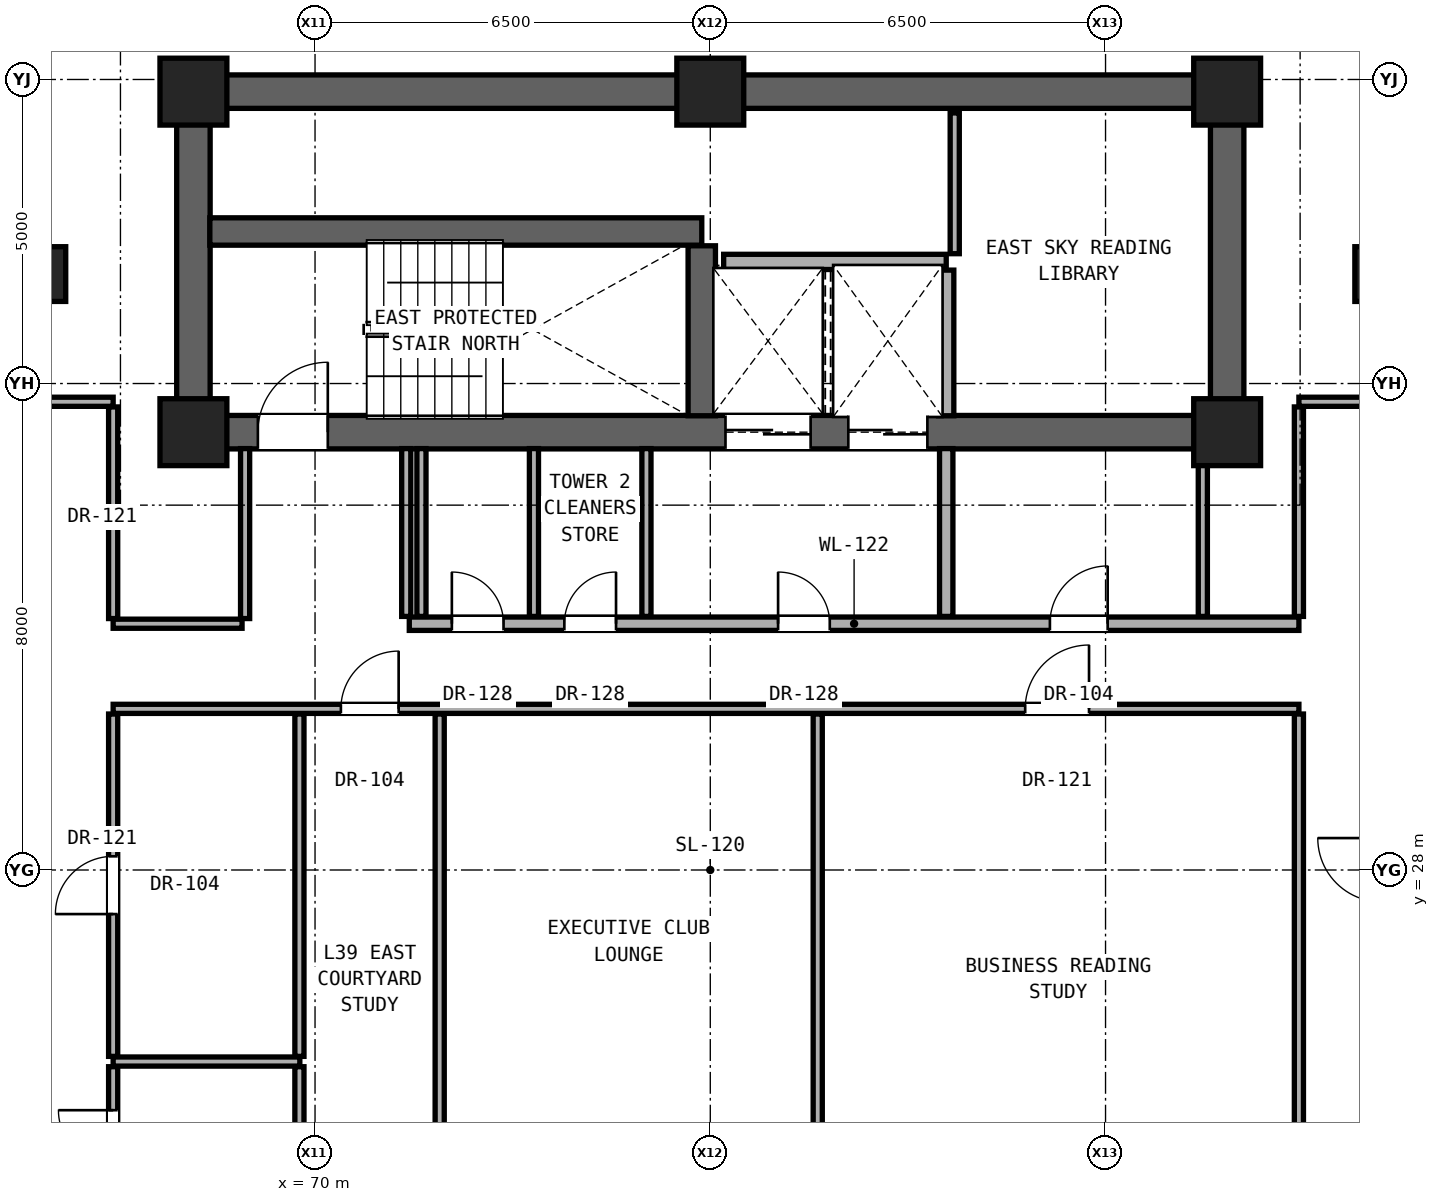
"""IFC4 building model, lengths in metres.
Left out: names, types, materials, properties, quantities, classifications, styles, units other than length and angle.
Written with IfcOpenShell. Run it as: python <this file> out.ifc"""

import sys

from ifc_helpers import new_model, si_unit, direction, frame, frame_2d, origin, origin_2d, place, context, subcontext, project, spatial, rectangle, extrude, element, fill, save


model = new_model("IFC4")
c1 = context("Model", 3, precision=1e-05, world=origin(), true_north=direction((0.0, 1.0)))
c2 = subcontext(c1, "Body", "Model", "MODEL_VIEW")
j1 = project(units=[si_unit("LENGTHUNIT", "METRE"), si_unit("PLANEANGLEUNIT", "RADIAN")], contexts=[c1])
p1 = place(None, origin())
s1 = spatial("IfcSite", under=j1, at=p1, CompositionType="ELEMENT")
p2 = place(p1, origin())
s2 = spatial("IfcBuilding", under=s1, at=p2, CompositionType="ELEMENT")
p3 = place(p2, frame((0.0, 0.0, 137.9)))
s3 = spatial("IfcBuildingStorey", under=s2, at=p3, CompositionType="ELEMENT", Elevation=137.9)
for number, where, z_axis, x_axis in (
    (1, (68.0, 35.2, 0.0), (0.0, 0.0, 1.0), (1.0, 0.0, 0.0)),
    (2, (85.0, 35.2, 0.0), (0.0, 0.0, 1.0), (1.0, 0.0, 0.0)),
    (3, (68.0, 40.8, 0.0), (0.0, 0.0, 1.0), (1.0, 0.0, 0.0)),
    (4, (76.5, 40.8, 0.0), (0.0, 0.0, 1.0), (1.0, 0.0, 0.0)),
    (5, (85.0, 40.8, 0.0), (0.0, 0.0, 1.0), (1.0, 0.0, 0.0)),
):
    element("IfcColumn", number, at=place(p3, frame(where, z_axis=z_axis, x_axis=x_axis)), inside=s3, PredefinedType="COLUMN", context=c2, shape_type="SweptSolid", body=[
        extrude(rectangle(XDim=1.1, YDim=1.1, at=origin_2d()), origin(), (0.0, 0.0, 1.0), 3.3),
    ])
for number, where, z_axis, x_axis in (
    (6, (65.6, 37.8, 0.0), (0.0, 0.0, 1.0), (1.0, 0.0, 0.0)),
    (7, (87.4, 37.8, 0.0), (0.0, 0.0, 1.0), (1.0, 0.0, 0.0)),
):
    element("IfcColumn", number, at=place(p3, frame(where, z_axis=z_axis, x_axis=x_axis)), inside=s3, PredefinedType="PILASTER", context=c2, shape_type="SweptSolid", body=[
        extrude(rectangle(XDim=0.6, YDim=0.9, at=origin_2d()), origin(), (0.0, 0.0, 1.0), 3.3),
    ])
p4 = place(p3, frame((68.0, 40.8, 0.0), z_axis=(0.0, 0.0, 1.0), x_axis=(1.0, 0.0, 0.0)))
e8 = element("IfcWall", 8, at=p4, inside=s3, PredefinedType="SHEAR", context=c2, shape_type="SweptSolid", body=[
    extrude(rectangle(XDim=17.0, YDim=0.55, at=frame_2d((8.5, 0.0))), origin(), (0.0, 0.0, 1.0), 3.08),
])
for number, where, z_axis, x_axis in (
    (9, (68.0, 35.2, 0.0), (0.0, 0.0, 1.0), (0.0, 1.0, 0.0)),
    (10, (85.0, 35.2, 0.0), (0.0, 0.0, 1.0), (0.0, 1.0, 0.0)),
):
    element("IfcWall", number, at=place(p3, frame(where, z_axis=z_axis, x_axis=x_axis)), inside=s3, PredefinedType="SHEAR", context=c2, shape_type="SweptSolid", body=[
        extrude(rectangle(XDim=5.6, YDim=0.55, at=frame_2d((2.8, 0.0))), origin(), (0.0, 0.0, 1.0), 3.08),
    ])
p5 = place(p3, frame((68.0, 35.2, 0.0), z_axis=(0.0, 0.0, 1.0), x_axis=(1.0, 0.0, 0.0)))
e11 = element("IfcWall", 11, at=p5, inside=s3, PredefinedType="SHEAR", context=c2, shape_type="SweptSolid", body=[
    extrude(rectangle(XDim=17.0, YDim=0.55, at=frame_2d((8.5, 0.0))), origin(), (0.0, 0.0, 1.0), 3.08),
])
p6 = place(p5, frame((1.06, 0.0, 0.0)))
e12 = element("IfcOpeningElement", 12, at=p6, cuts=e11, PredefinedType="OPENING", context=c2, shape_type="SweptSolid", body=[
    extrude(rectangle(XDim=1.15, YDim=2.2, at=frame_2d((0.575, 1.1))), frame((0.0, 0.285, 0.0), z_axis=(0.0, -1.0, 0.0), x_axis=(1.0, 0.0, 0.0)), (0.0, 0.0, 1.0), 0.57),
])
p7 = place(p5, frame((8.75, 0.0, 0.0)))
e13 = element("IfcOpeningElement", 13, at=p7, cuts=e11, PredefinedType="OPENING", context=c2, shape_type="SweptSolid", body=[
    extrude(rectangle(XDim=1.4, YDim=2.35, at=frame_2d((0.7, 1.175))), frame((0.0, 0.285, 0.0), z_axis=(0.0, -1.0, 0.0), x_axis=(1.0, 0.0, 0.0)), (0.0, 0.0, 1.0), 0.57),
])
p8 = place(p5, frame((10.77, 0.0, 0.0)))
e14 = element("IfcOpeningElement", 14, at=p8, cuts=e11, PredefinedType="OPENING", context=c2, shape_type="SweptSolid", body=[
    extrude(rectangle(XDim=1.3, YDim=2.3, at=frame_2d((0.65, 1.15))), frame((0.0, 0.285, 0.0), z_axis=(0.0, -1.0, 0.0), x_axis=(1.0, 0.0, 0.0)), (0.0, 0.0, 1.0), 0.57),
])
p9 = place(p3, frame((66.68, 24.85, 0.0), z_axis=(0.0, 0.0, 1.0), x_axis=(1.0, 0.0, 0.0)))
e15 = element("IfcWall", 15, at=p9, inside=s3, PredefinedType="PARTITIONING", context=c2, shape_type="SweptSolid", body=[
    extrude(rectangle(XDim=3.07, YDim=0.15, at=frame_2d((1.535, 0.0))), origin(), (0.0, 0.0, 1.0), 2.216),
])
p10 = place(p3, frame((66.68, 30.65, 0.0), z_axis=(0.0, 0.0, 1.0), x_axis=(1.0, 0.0, 0.0)))
e16 = element("IfcWall", 16, at=p10, inside=s3, PredefinedType="PARTITIONING", context=c2, shape_type="SweptSolid", body=[
    extrude(rectangle(XDim=19.5, YDim=0.15, at=frame_2d((9.75, 0.0))), origin(), (0.0, 0.0, 1.0), 2.216),
])
p11 = place(p10, frame((3.745, 0.0, 0.0)))
e17 = element("IfcOpeningElement", 17, at=p11, cuts=e16, PredefinedType="OPENING", context=c2, shape_type="SweptSolid", body=[
    extrude(rectangle(XDim=0.95, YDim=2.15, at=frame_2d((0.475, 1.075))), frame((0.0, 0.085, 0.0), z_axis=(0.0, -1.0, 0.0), x_axis=(1.0, 0.0, 0.0)), (0.0, 0.0, 1.0), 0.17),
])
p12 = place(p10, frame((14.999, 0.0, 0.0)))
e18 = element("IfcOpeningElement", 18, at=p12, cuts=e16, PredefinedType="OPENING", context=c2, shape_type="SweptSolid", body=[
    extrude(rectangle(XDim=1.05, YDim=2.2, at=frame_2d((0.525, 1.1))), frame((0.0, 0.085, 0.0), z_axis=(0.0, -1.0, 0.0), x_axis=(1.0, 0.0, 0.0)), (0.0, 0.0, 1.0), 0.17),
])
p13 = place(p3, frame((66.68, 32.05, 0.0), z_axis=(0.0, 0.0, 1.0), x_axis=(1.0, 0.0, 0.0)))
e19 = element("IfcWall", 19, at=p13, inside=s3, PredefinedType="PARTITIONING", context=c2, shape_type="SweptSolid", body=[
    extrude(rectangle(XDim=2.12, YDim=0.15, at=frame_2d((1.06, 0.0))), origin(), (0.0, 0.0, 1.0), 2.216),
])
p14 = place(p3, frame((71.55, 32.05, 0.0), z_axis=(0.0, 0.0, 1.0), x_axis=(1.0, 0.0, 0.0)))
e20 = element("IfcWall", 20, at=p14, inside=s3, PredefinedType="SOLIDWALL", context=c2, shape_type="SweptSolid", body=[
    extrude(rectangle(XDim=14.63, YDim=0.22, at=frame_2d((7.315, 0.0))), origin(), (0.0, 0.0, 1.0), 2.216),
])
p15 = place(p14, frame((6.065, 0.0, 0.0)))
e21 = element("IfcOpeningElement", 21, at=p15, cuts=e20, PredefinedType="OPENING", context=c2, shape_type="SweptSolid", body=[
    extrude(rectangle(XDim=0.85, YDim=2.01, at=frame_2d((0.425, 1.005))), frame((0.0, 0.12, 0.0), z_axis=(0.0, -1.0, 0.0), x_axis=(1.0, 0.0, 0.0)), (0.0, 0.0, 1.0), 0.24),
])
p16 = place(p14, frame((10.535, 0.0, 0.0)))
e22 = element("IfcOpeningElement", 22, at=p16, cuts=e20, PredefinedType="OPENING", context=c2, shape_type="SweptSolid", body=[
    extrude(rectangle(XDim=0.95, YDim=2.15, at=frame_2d((0.475, 1.075))), frame((0.0, 0.12, 0.0), z_axis=(0.0, -1.0, 0.0), x_axis=(1.0, 0.0, 0.0)), (0.0, 0.0, 1.0), 0.24),
])
p17 = place(p14, frame((0.7, 0.0, 0.0)))
e23 = element("IfcOpeningElement", 23, at=p17, cuts=e20, PredefinedType="OPENING", context=c2, shape_type="SweptSolid", body=[
    extrude(rectangle(XDim=0.85, YDim=2.01, at=frame_2d((0.425, 1.005))), frame((0.0, 0.12, 0.0), z_axis=(0.0, -1.0, 0.0), x_axis=(1.0, 0.0, 0.0)), (0.0, 0.0, 1.0), 0.24),
])
p18 = place(p14, frame((2.55, 0.0, 0.0)))
e24 = element("IfcOpeningElement", 24, at=p18, cuts=e20, PredefinedType="OPENING", context=c2, shape_type="SweptSolid", body=[
    extrude(rectangle(XDim=0.85, YDim=2.01, at=frame_2d((0.425, 1.005))), frame((0.0, 0.12, 0.0), z_axis=(0.0, -1.0, 0.0), x_axis=(1.0, 0.0, 0.0)), (0.0, 0.0, 1.0), 0.24),
])
p19 = place(p3, frame((65.32, 35.7, 0.0), z_axis=(0.0, 0.0, 1.0), x_axis=(1.0, 0.0, 0.0)))
e25 = element("IfcWall", 25, at=p19, inside=s3, PredefinedType="PARTITIONING", context=c2, shape_type="SweptSolid", body=[
    extrude(rectangle(XDim=1.36, YDim=0.15, at=frame_2d((0.68, 0.0))), origin(), (0.0, 0.0, 1.0), 3.08),
])
p20 = place(p3, frame((86.18, 35.7, 0.0), z_axis=(0.0, 0.0, 1.0), x_axis=(1.0, 0.0, 0.0)))
e26 = element("IfcWall", 26, at=p20, inside=s3, PredefinedType="PARTITIONING", context=c2, shape_type="SweptSolid", body=[
    extrude(rectangle(XDim=1.36, YDim=0.15, at=frame_2d((0.68, 0.0))), origin(), (0.0, 0.0, 1.0), 3.08),
])
p21 = place(p3, frame((76.72, 38.0, 0.0), z_axis=(0.0, 0.0, 1.0), x_axis=(1.0, 0.0, 0.0)))
e27 = element("IfcWall", 27, at=p21, inside=s3, PredefinedType="SOLIDWALL", context=c2, shape_type="SweptSolid", body=[
    extrude(rectangle(XDim=3.66, YDim=0.25, at=frame_2d((1.83, 0.0))), origin(), (0.0, 0.0, 1.0), 3.08),
])
p22 = place(p3, frame((68.27, 38.5, 0.0), z_axis=(0.0, 0.0, 1.0), x_axis=(1.0, 0.0, 0.0)))
e28 = element("IfcWall", 28, at=p22, inside=s3, PredefinedType="SHEAR", context=c2, shape_type="SweptSolid", body=[
    extrude(rectangle(XDim=8.09, YDim=0.45, at=frame_2d((4.045, 0.0))), origin(), (0.0, 0.0, 1.0), 3.08),
])
p23 = place(p3, frame((66.68, 22.435, 0.0), z_axis=(0.0, 0.0, 1.0), x_axis=(0.0, 1.0, 0.0)))
e29 = element("IfcWall", 29, at=p23, inside=s3, PredefinedType="PARTITIONING", context=c2, shape_type="SweptSolid", body=[
    extrude(rectangle(XDim=2.33, YDim=0.15, at=frame_2d((1.165, 0.0))), origin(), (0.0, 0.0, 1.0), 3.08),
])
p24 = place(p23, frame((0.715, 0.0, 0.0)))
e30 = element("IfcOpeningElement", 30, at=p24, cuts=e29, PredefinedType="OPENING", context=c2, shape_type="SweptSolid", body=[
    extrude(rectangle(XDim=0.9, YDim=2.1, at=frame_2d((0.45, 1.05))), frame((0.0, 0.085, 0.0), z_axis=(0.0, -1.0, 0.0), x_axis=(1.0, 0.0, 0.0)), (0.0, 0.0, 1.0), 0.17),
])
p25 = place(p3, frame((66.68, 24.935, 0.0), z_axis=(0.0, 0.0, 1.0), x_axis=(0.0, 1.0, 0.0)))
e31 = element("IfcWall", 31, at=p25, inside=s3, PredefinedType="PARTITIONING", context=c2, shape_type="SweptSolid", body=[
    extrude(rectangle(XDim=5.63, YDim=0.15, at=frame_2d((2.815, 0.0))), origin(), (0.0, 0.0, 1.0), 2.376),
])
p26 = place(p25, frame((2.34, 0.0, 0.0)))
e32 = element("IfcOpeningElement", 32, at=p26, cuts=e31, PredefinedType="OPENING", context=c2, shape_type="SweptSolid", body=[
    extrude(rectangle(XDim=0.95, YDim=2.15, at=frame_2d((0.475, 1.075))), frame((0.0, 0.085, 0.0), z_axis=(0.0, -1.0, 0.0), x_axis=(1.0, 0.0, 0.0)), (0.0, 0.0, 1.0), 0.17),
])
p27 = place(p3, frame((66.68, 32.135, 0.0), z_axis=(0.0, 0.0, 1.0), x_axis=(0.0, 1.0, 0.0)))
e33 = element("IfcWall", 33, at=p27, inside=s3, PredefinedType="PARTITIONING", context=c2, shape_type="SweptSolid", body=[
    extrude(rectangle(XDim=3.48, YDim=0.15, at=frame_2d((1.74, 0.0))), origin(), (0.0, 0.0, 1.0), 2.472),
])
p28 = place(p3, frame((68.85, 32.135, 0.0), z_axis=(0.0, 0.0, 1.0), x_axis=(0.0, 1.0, 0.0)))
e34 = element("IfcWall", 34, at=p28, inside=s3, PredefinedType="PARTITIONING", context=c2, shape_type="SweptSolid", body=[
    extrude(rectangle(XDim=2.795, YDim=0.15, at=frame_2d((1.397, 0.0))), origin(), (0.0, 0.0, 1.0), 3.08),
])
p29 = place(p3, frame((69.743, 22.435, 0.0), z_axis=(0.0, 0.0, 1.0), x_axis=(0.0, 1.0, 0.0)))
e35 = element("IfcWall", 35, at=p29, inside=s3, PredefinedType="PARTITIONING", context=c2, shape_type="SweptSolid", body=[
    extrude(rectangle(XDim=2.33, YDim=0.15, at=frame_2d((1.165, 0.0))), origin(), (0.0, 0.0, 1.0), 3.08),
])
p30 = place(p3, frame((69.743, 24.935, 0.0), z_axis=(0.0, 0.0, 1.0), x_axis=(0.0, 1.0, 0.0)))
e36 = element("IfcWall", 36, at=p30, inside=s3, PredefinedType="PARTITIONING", context=c2, shape_type="SweptSolid", body=[
    extrude(rectangle(XDim=5.63, YDim=0.15, at=frame_2d((2.815, 0.0))), origin(), (0.0, 0.0, 1.0), 2.216),
])
for number, where, z_axis, x_axis in (
    (37, (71.5, 32.17, 0.0), (0.0, 0.0, 1.0), (0.0, 1.0, 0.0)),
    (38, (71.75, 32.17, 0.0), (0.0, 0.0, 1.0), (0.0, 1.0, 0.0)),
):
    element("IfcWall", number, at=place(p3, frame(where, z_axis=z_axis, x_axis=x_axis)), inside=s3, PredefinedType="PARTITIONING", context=c2, shape_type="SweptSolid", body=[
        extrude(rectangle(XDim=2.76, YDim=0.15, at=frame_2d((1.38, 0.0))), origin(), (0.0, 0.0, 1.0), 3.08),
    ])
p31 = place(p3, frame((72.05, 22.435, 0.0), z_axis=(0.0, 0.0, 1.0), x_axis=(0.0, 1.0, 0.0)))
e39 = element("IfcWall", 39, at=p31, inside=s3, PredefinedType="PARTITIONING", context=c2, shape_type="SweptSolid", body=[
    extrude(rectangle(XDim=8.13, YDim=0.15, at=frame_2d((4.065, 0.0))), origin(), (0.0, 0.0, 1.0), 2.216),
])
for number, where, z_axis, x_axis in (
    (40, (73.6, 32.17, 0.0), (0.0, 0.0, 1.0), (0.0, 1.0, 0.0)),
    (41, (75.45, 32.17, 0.0), (0.0, 0.0, 1.0), (0.0, 1.0, 0.0)),
):
    element("IfcWall", number, at=place(p3, frame(where, z_axis=z_axis, x_axis=x_axis)), inside=s3, PredefinedType="PARTITIONING", context=c2, shape_type="SweptSolid", body=[
        extrude(rectangle(XDim=2.76, YDim=0.15, at=frame_2d((1.38, 0.0))), origin(), (0.0, 0.0, 1.0), 3.08),
    ])
p32 = place(p3, frame((76.36, 35.47, 0.0), z_axis=(0.0, 0.0, 1.0), x_axis=(0.0, 1.0, 0.0)))
e42 = element("IfcWall", 42, at=p32, inside=s3, PredefinedType="SHEAR", context=c2, shape_type="SweptSolid", body=[
    extrude(rectangle(XDim=2.795, YDim=0.45, at=frame_2d((1.397, 0.0))), origin(), (0.0, 0.0, 1.0), 3.08),
])
p33 = place(p3, frame((78.267, 22.435, 0.0), z_axis=(0.0, 0.0, 1.0), x_axis=(0.0, 1.0, 0.0)))
e43 = element("IfcWall", 43, at=p33, inside=s3, PredefinedType="PARTITIONING", context=c2, shape_type="SweptSolid", body=[
    extrude(rectangle(XDim=8.13, YDim=0.15, at=frame_2d((4.065, 0.0))), origin(), (0.0, 0.0, 1.0), 2.216),
])
p34 = place(p3, frame((80.38, 32.17, 0.0), z_axis=(0.0, 0.0, 1.0), x_axis=(0.0, 1.0, 0.0)))
e44 = element("IfcWall", 44, at=p34, inside=s3, PredefinedType="SOLIDWALL", context=c2, shape_type="SweptSolid", body=[
    extrude(rectangle(XDim=2.76, YDim=0.22, at=frame_2d((1.38, 0.0))), origin(), (0.0, 0.0, 1.0), 3.08),
])
p35 = place(p3, frame((80.38, 35.47, 0.0), z_axis=(0.0, 0.0, 1.0), x_axis=(0.0, 1.0, 0.0)))
e45 = element("IfcWall", 45, at=p35, inside=s3, PredefinedType="SOLIDWALL", context=c2, shape_type="SweptSolid", body=[
    extrude(rectangle(XDim=2.395, YDim=0.25, at=frame_2d((1.198, 0.0))), origin(), (0.0, 0.0, 1.0), 3.08),
])
p36 = place(p3, frame((80.52, 38.135, 0.0), z_axis=(0.0, 0.0, 1.0), x_axis=(0.0, 1.0, 0.0)))
e46 = element("IfcWall", 46, at=p36, inside=s3, PredefinedType="PARTITIONING", context=c2, shape_type="SweptSolid", body=[
    extrude(rectangle(XDim=2.315, YDim=0.15, at=frame_2d((1.157, 0.0))), origin(), (0.0, 0.0, 1.0), 3.08),
])
p37 = place(p3, frame((84.6, 32.17, 0.0), z_axis=(0.0, 0.0, 1.0), x_axis=(0.0, 1.0, 0.0)))
e47 = element("IfcWall", 47, at=p37, inside=s3, PredefinedType="PARTITIONING", context=c2, shape_type="SweptSolid", body=[
    extrude(rectangle(XDim=2.76, YDim=0.15, at=frame_2d((1.38, 0.0))), origin(), (0.0, 0.0, 1.0), 3.08),
])
p38 = place(p3, frame((86.18, 22.435, 0.0), z_axis=(0.0, 0.0, 1.0), x_axis=(0.0, 1.0, 0.0)))
e48 = element("IfcWall", 48, at=p38, inside=s3, PredefinedType="PARTITIONING", context=c2, shape_type="SweptSolid", body=[
    extrude(rectangle(XDim=8.13, YDim=0.15, at=frame_2d((4.065, 0.0))), origin(), (0.0, 0.0, 1.0), 2.376),
])
p39 = place(p3, frame((86.18, 32.17, 0.0), z_axis=(0.0, 0.0, 1.0), x_axis=(0.0, 1.0, 0.0)))
e49 = element("IfcWall", 49, at=p39, inside=s3, PredefinedType="PARTITIONING", context=c2, shape_type="SweptSolid", body=[
    extrude(rectangle(XDim=3.445, YDim=0.15, at=frame_2d((1.723, 0.0))), origin(), (0.0, 0.0, 1.0), 2.472),
])
p40 = place(p6, origin())
e50 = element("IfcDoor", 50, at=p40, inside=s3, OperationType="SINGLE_SWING_RIGHT", PredefinedType="DOOR", context=c2, shape_type="SweptSolid", body=[
    extrude(rectangle(XDim=1.15, YDim=2.2, at=frame_2d((0.575, 1.1))), frame((0.0, 0.025, 0.0), z_axis=(0.0, -1.0, 0.0), x_axis=(1.0, 0.0, 0.0)), (0.0, 0.0, 1.0), 0.05),
])
fill(e12, e50)
p41 = place(p15, origin())
e51 = element("IfcDoor", 51, at=p41, inside=s3, OperationType="SINGLE_SWING_LEFT", PredefinedType="DOOR", context=c2, shape_type="SweptSolid", body=[
    extrude(rectangle(XDim=0.85, YDim=2.01, at=frame_2d((0.425, 1.005))), frame((0.0, 0.025, 0.0), z_axis=(0.0, -1.0, 0.0), x_axis=(1.0, 0.0, 0.0)), (0.0, 0.0, 1.0), 0.05),
])
fill(e21, e51)
p42 = place(p16, origin())
e52 = element("IfcDoor", 52, at=p42, inside=s3, OperationType="SINGLE_SWING_RIGHT", PredefinedType="DOOR", context=c2, shape_type="SweptSolid", body=[
    extrude(rectangle(XDim=0.95, YDim=2.15, at=frame_2d((0.475, 1.075))), frame((0.0, 0.025, 0.0), z_axis=(0.0, -1.0, 0.0), x_axis=(1.0, 0.0, 0.0)), (0.0, 0.0, 1.0), 0.05),
])
fill(e22, e52)
p43 = place(p17, origin())
e53 = element("IfcDoor", 53, at=p43, inside=s3, OperationType="SINGLE_SWING_LEFT", PredefinedType="DOOR", context=c2, shape_type="SweptSolid", body=[
    extrude(rectangle(XDim=0.85, YDim=2.01, at=frame_2d((0.425, 1.005))), frame((0.0, 0.025, 0.0), z_axis=(0.0, -1.0, 0.0), x_axis=(1.0, 0.0, 0.0)), (0.0, 0.0, 1.0), 0.05),
])
fill(e23, e53)
p44 = place(p18, origin())
e54 = element("IfcDoor", 54, at=p44, inside=s3, OperationType="SINGLE_SWING_RIGHT", PredefinedType="DOOR", context=c2, shape_type="SweptSolid", body=[
    extrude(rectangle(XDim=0.85, YDim=2.01, at=frame_2d((0.425, 1.005))), frame((0.0, 0.025, 0.0), z_axis=(0.0, -1.0, 0.0), x_axis=(1.0, 0.0, 0.0)), (0.0, 0.0, 1.0), 0.05),
])
fill(e24, e54)
p45 = place(p24, origin())
e55 = element("IfcDoor", 55, at=p45, inside=s3, OperationType="SINGLE_SWING_RIGHT", PredefinedType="DOOR", context=c2, shape_type="SweptSolid", body=[
    extrude(rectangle(XDim=0.9, YDim=2.1, at=frame_2d((0.45, 1.05))), frame((0.0, 0.025, 0.0), z_axis=(0.0, -1.0, 0.0), x_axis=(1.0, 0.0, 0.0)), (0.0, 0.0, 1.0), 0.05),
])
fill(e30, e55)
p46 = place(p26, origin())
e56 = element("IfcDoor", 56, at=p46, inside=s3, OperationType="SINGLE_SWING_LEFT", PredefinedType="DOOR", context=c2, shape_type="SweptSolid", body=[
    extrude(rectangle(XDim=0.95, YDim=2.15, at=frame_2d((0.475, 1.075))), frame((0.0, 0.025, 0.0), z_axis=(0.0, -1.0, 0.0), x_axis=(1.0, 0.0, 0.0)), (0.0, 0.0, 1.0), 0.05),
])
fill(e32, e56)
p47 = place(p11, origin())
e57 = element("IfcDoor", 57, at=p47, inside=s3, OperationType="SINGLE_SWING_RIGHT", PredefinedType="DOOR", context=c2, shape_type="SweptSolid", body=[
    extrude(rectangle(XDim=0.95, YDim=2.15, at=frame_2d((0.475, 1.075))), frame((0.0, 0.025, 0.0), z_axis=(0.0, -1.0, 0.0), x_axis=(1.0, 0.0, 0.0)), (0.0, 0.0, 1.0), 0.05),
])
fill(e17, e57)
p48 = place(p12, origin())
e58 = element("IfcDoor", 58, at=p48, inside=s3, OperationType="SINGLE_SWING_RIGHT", PredefinedType="DOOR", context=c2, shape_type="SweptSolid", body=[
    extrude(rectangle(XDim=1.05, YDim=2.2, at=frame_2d((0.525, 1.1))), frame((0.0, 0.025, 0.0), z_axis=(0.0, -1.0, 0.0), x_axis=(1.0, 0.0, 0.0)), (0.0, 0.0, 1.0), 0.05),
])
fill(e18, e58)
p49 = place(p7, origin())
e59 = element("IfcDoor", 59, at=p49, inside=s3, OperationType="DOUBLE_DOOR_SLIDING", PredefinedType="DOOR", context=c2, shape_type="SweptSolid", body=[
    extrude(rectangle(XDim=1.4, YDim=2.35, at=frame_2d((0.7, 1.175))), frame((0.0, 0.025, 0.0), z_axis=(0.0, -1.0, 0.0), x_axis=(1.0, 0.0, 0.0)), (0.0, 0.0, 1.0), 0.05),
])
fill(e13, e59)
p50 = place(p8, origin())
e60 = element("IfcDoor", 60, at=p50, inside=s3, OperationType="DOUBLE_DOOR_SLIDING", PredefinedType="DOOR", context=c2, shape_type="SweptSolid", body=[
    extrude(rectangle(XDim=1.3, YDim=2.3, at=frame_2d((0.65, 1.15))), frame((0.0, 0.025, 0.0), z_axis=(0.0, -1.0, 0.0), x_axis=(1.0, 0.0, 0.0)), (0.0, 0.0, 1.0), 0.05),
])
fill(e14, e60)
save(model, sys.argv[1])
